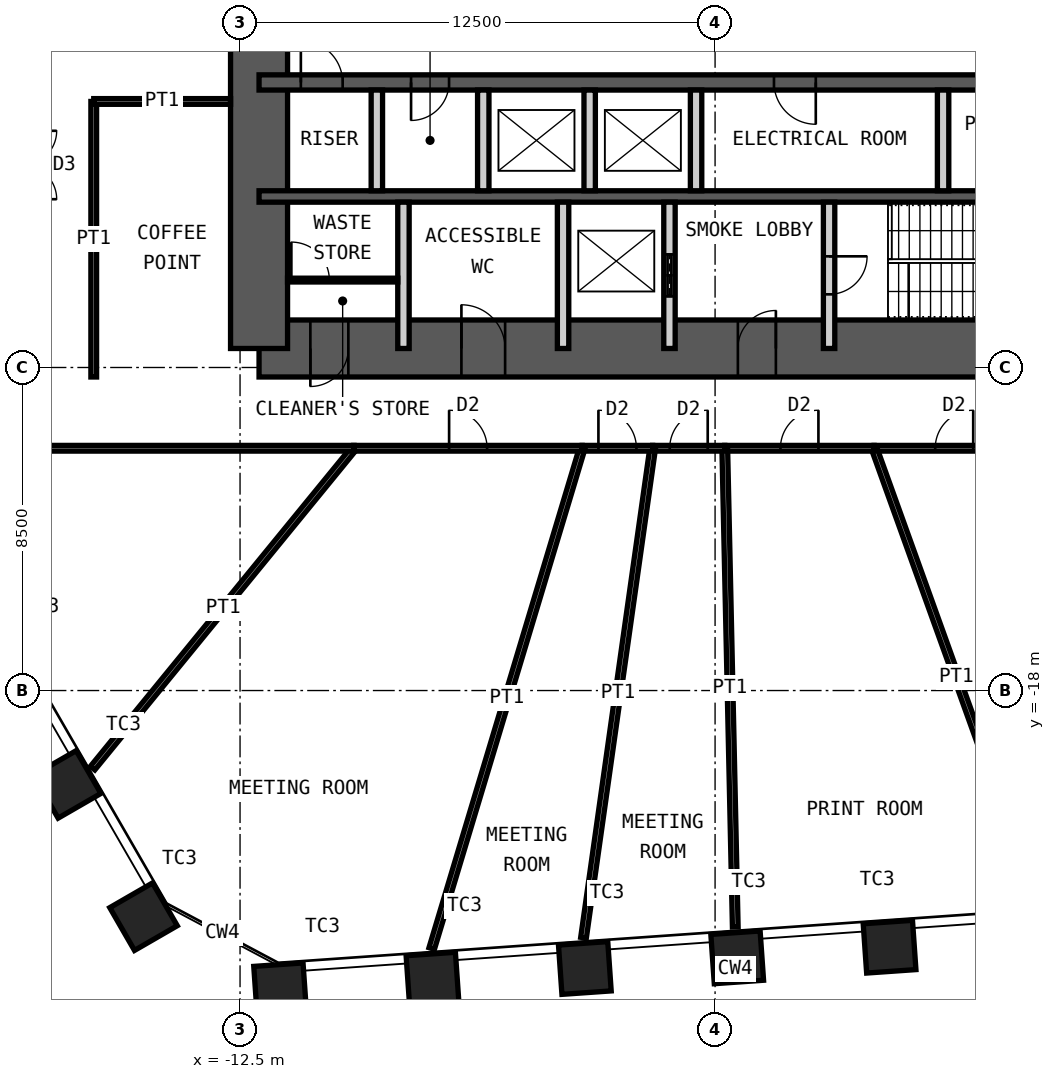
"""IFC4 building model, lengths in metres.
Left out: names, types, materials, properties, quantities, classifications, styles, units other than length and angle.
Written with IfcOpenShell. Run it as: python <this file> out.ifc"""

import sys

from ifc_helpers import new_model, si_unit, direction, frame, frame_2d, origin, origin_2d, place, context, subcontext, project, spatial, rectangle, hollow_rectangle, extrude, element, fill, save


model = new_model("IFC4")
c1 = context("Model", 3, precision=1e-05, world=origin(), true_north=direction((0.0, 1.0)))
c2 = subcontext(c1, "Body", "Model", "MODEL_VIEW")
j1 = project(units=[si_unit("LENGTHUNIT", "METRE"), si_unit("PLANEANGLEUNIT", "RADIAN")], contexts=[c1])
p1 = place(None, origin())
s1 = spatial("IfcSite", under=j1, at=p1, CompositionType="ELEMENT")
p2 = place(p1, origin())
s2 = spatial("IfcBuilding", under=s1, at=p2, CompositionType="ELEMENT")
p3 = place(p2, frame((0.0, 0.0, 111.4)))
s3 = spatial("IfcBuildingStorey", under=s2, at=p3, CompositionType="ELEMENT", Elevation=111.4)
for number, where, z_axis, x_axis in (
    (1, (4.592, -24.74, 0.0), (0.0, 0.0, 1.0), (0.998, 0.07, 0.0)),
    (2, (0.582, -25.02, 0.0), (0.0, 0.0, 1.0), (0.998, 0.07, 0.0)),
    (3, (-3.427, -25.301, 0.0), (0.0, 0.0, 1.0), (0.998, 0.07, 0.0)),
    (4, (-7.436, -25.581, 0.0), (0.0, 0.0, 1.0), (0.998, 0.07, 0.0)),
    (5, (-11.446, -25.861, 0.0), (0.0, 0.0, 1.0), (0.998, 0.07, 0.0)),
    (6, (-15.04, -23.95, 0.0), (0.0, 0.0, 1.0), (0.5, -0.866, 0.0)),
    (7, (-17.049, -20.47, 0.0), (0.0, 0.0, 1.0), (0.5, -0.866, 0.0)),
):
    element("IfcColumn", number, at=place(p3, frame(where, z_axis=z_axis, x_axis=x_axis)), inside=s3, PredefinedType="COLUMN", context=c2, shape_type="SweptSolid", body=[
        extrude(hollow_rectangle(XDim=1.3, YDim=1.3, WallThickness=0.1, at=origin_2d()), origin(), (0.0, 0.0, 1.0), 4.2),
    ])
p4 = place(p3, frame((-12.0, -9.0, 0.0), z_axis=(0.0, 0.0, 1.0), x_axis=(1.0, 0.0, 0.0)))
e8 = element("IfcWall", 8, at=p4, inside=s3, PredefinedType="SHEAR", context=c2, shape_type="SweptSolid", body=[
    extrude(rectangle(XDim=24.0, YDim=1.5, at=frame_2d((12.0, 0.0))), origin(), (0.0, 0.0, 1.0), 4.2),
])
p5 = place(p4, frame((1.35, 0.0, 0.0)))
e9 = element("IfcOpeningElement", 9, at=p5, cuts=e8, PredefinedType="OPENING", context=c2, shape_type="SweptSolid", body=[
    extrude(rectangle(XDim=1.0, YDim=2.1, at=frame_2d((0.5, 1.05))), frame((0.0, 0.76, 0.0), z_axis=(0.0, -1.0, 0.0), x_axis=(1.0, 0.0, 0.0)), (0.0, 0.0, 1.0), 1.52),
])
p6 = place(p4, frame((5.325, 0.0, 0.0)))
e10 = element("IfcOpeningElement", 10, at=p6, cuts=e8, PredefinedType="OPENING", context=c2, shape_type="SweptSolid", body=[
    extrude(rectangle(XDim=1.15, YDim=2.1, at=frame_2d((0.575, 1.05))), frame((0.0, 0.76, 0.0), z_axis=(0.0, -1.0, 0.0), x_axis=(1.0, 0.0, 0.0)), (0.0, 0.0, 1.0), 1.52),
])
p7 = place(p4, frame((12.6, 0.0, 0.0)))
e11 = element("IfcOpeningElement", 11, at=p7, cuts=e8, PredefinedType="OPENING", context=c2, shape_type="SweptSolid", body=[
    extrude(rectangle(XDim=1.0, YDim=2.1, at=frame_2d((0.5, 1.05))), frame((0.0, 0.76, 0.0), z_axis=(0.0, -1.0, 0.0), x_axis=(1.0, 0.0, 0.0)), (0.0, 0.0, 1.0), 1.52),
])
p8 = place(p3, frame((-12.0, -9.0, 0.0), z_axis=(0.0, 0.0, 1.0), x_axis=(0.0, 1.0, 0.0)))
e12 = element("IfcWall", 12, at=p8, inside=s3, PredefinedType="SHEAR", context=c2, shape_type="SweptSolid", body=[
    extrude(rectangle(XDim=18.0, YDim=1.5, at=frame_2d((9.0, 0.0))), origin(), (0.0, 0.0, 1.0), 4.2),
])
p9 = place(p8, frame((8.1, 0.0, 0.0)))
e13 = element("IfcOpeningElement", 13, at=p9, cuts=e12, PredefinedType="OPENING", context=c2, shape_type="SweptSolid", body=[
    extrude(rectangle(XDim=1.8, YDim=2.1, at=frame_2d((0.9, 1.05))), frame((0.0, 0.76, 0.0), z_axis=(0.0, -1.0, 0.0), x_axis=(1.0, 0.0, 0.0)), (0.0, 0.0, 1.0), 1.52),
])
p10 = place(p3, frame((-12.0, -2.0, 0.0), z_axis=(0.0, 0.0, 1.0), x_axis=(1.0, 0.0, 0.0)))
e14 = element("IfcWall", 14, at=p10, inside=s3, PredefinedType="SHEAR", context=c2, shape_type="SweptSolid", body=[
    extrude(rectangle(XDim=24.0, YDim=0.4, at=frame_2d((12.0, 0.0))), origin(), (0.0, 0.0, 1.0), 4.2),
])
p11 = place(p10, frame((1.1, 0.0, 0.0)))
e15 = element("IfcOpeningElement", 15, at=p11, cuts=e14, PredefinedType="OPENING", context=c2, shape_type="SweptSolid", body=[
    extrude(rectangle(XDim=1.1, YDim=2.1, at=frame_2d((0.55, 1.05))), frame((0.0, 0.21, 0.0), z_axis=(0.0, -1.0, 0.0), x_axis=(1.0, 0.0, 0.0)), (0.0, 0.0, 1.0), 0.42),
])
p12 = place(p10, frame((13.55, 0.0, 0.0)))
e16 = element("IfcOpeningElement", 16, at=p12, cuts=e14, PredefinedType="OPENING", context=c2, shape_type="SweptSolid", body=[
    extrude(rectangle(XDim=1.1, YDim=2.1, at=frame_2d((0.55, 1.05))), frame((0.0, 0.21, 0.0), z_axis=(0.0, -1.0, 0.0), x_axis=(1.0, 0.0, 0.0)), (0.0, 0.0, 1.0), 0.42),
])
p13 = place(p10, frame((20.7, 0.0, 0.0)))
e17 = element("IfcOpeningElement", 17, at=p13, cuts=e14, PredefinedType="OPENING", context=c2, shape_type="SweptSolid", body=[
    extrude(rectangle(XDim=1.1, YDim=2.1, at=frame_2d((0.55, 1.05))), frame((0.0, 0.21, 0.0), z_axis=(0.0, -1.0, 0.0), x_axis=(1.0, 0.0, 0.0)), (0.0, 0.0, 1.0), 0.42),
])
p14 = place(p10, frame((4.0, 0.0, 0.0)))
e18 = element("IfcOpeningElement", 18, at=p14, cuts=e14, PredefinedType="OPENING", context=c2, shape_type="SweptSolid", body=[
    extrude(rectangle(XDim=1.0, YDim=2.1, at=frame_2d((0.5, 1.05))), frame((0.0, 0.21, 0.0), z_axis=(0.0, -1.0, 0.0), x_axis=(1.0, 0.0, 0.0)), (0.0, 0.0, 1.0), 0.42),
])
p15 = place(p3, frame((-12.0, -5.0, 0.0), z_axis=(0.0, 0.0, 1.0), x_axis=(1.0, 0.0, 0.0)))
e19 = element("IfcWall", 19, at=p15, inside=s3, PredefinedType="SHEAR", context=c2, shape_type="SweptSolid", body=[
    extrude(rectangle(XDim=24.0, YDim=0.3, at=frame_2d((12.0, 0.0))), origin(), (0.0, 0.0, 1.0), 4.2),
])
for number, where, z_axis, x_axis in (
    (20, (-8.9, -4.85, 0.0), (0.0, 0.0, 1.0), (0.0, 1.0, 0.0)),
    (21, (-6.1, -4.85, 0.0), (0.0, 0.0, 1.0), (0.0, 1.0, 0.0)),
    (22, (-3.3, -4.85, 0.0), (0.0, 0.0, 1.0), (0.0, 1.0, 0.0)),
    (23, (-0.5, -4.85, 0.0), (0.0, 0.0, 1.0), (0.0, 1.0, 0.0)),
    (24, (6.0, -4.85, 0.0), (0.0, 0.0, 1.0), (0.0, 1.0, 0.0)),
):
    element("IfcWall", number, at=place(p3, frame(where, z_axis=z_axis, x_axis=x_axis)), inside=s3, PredefinedType="PARTITIONING", context=c2, shape_type="SweptSolid", body=[
        extrude(rectangle(XDim=2.65, YDim=0.3, at=frame_2d((1.325, 0.0))), origin(), (0.0, 0.0, 1.0), 3.98),
    ])
for number, where, z_axis, x_axis in (
    (25, (-8.2, -9.0, 0.0), (0.0, 0.0, 1.0), (0.0, 1.0, 0.0)),
    (26, (-4.0, -9.0, 0.0), (0.0, 0.0, 1.0), (0.0, 1.0, 0.0)),
):
    element("IfcWall", number, at=place(p3, frame(where, z_axis=z_axis, x_axis=x_axis)), inside=s3, PredefinedType="PARTITIONING", context=c2, shape_type="SweptSolid", body=[
        extrude(rectangle(XDim=3.85, YDim=0.3, at=frame_2d((1.925, 0.0))), origin(), (0.0, 0.0, 1.0), 3.98),
    ])
p16 = place(p3, frame((-1.2, -9.0, 0.0), z_axis=(0.0, 0.0, 1.0), x_axis=(0.0, 1.0, 0.0)))
e27 = element("IfcWall", 27, at=p16, inside=s3, PredefinedType="PARTITIONING", context=c2, shape_type="SweptSolid", body=[
    extrude(rectangle(XDim=3.85, YDim=0.3, at=frame_2d((1.925, 0.0))), origin(), (0.0, 0.0, 1.0), 3.98),
])
p17 = place(p16, frame((1.375, 0.0, 0.0)))
e28 = element("IfcOpeningElement", 28, at=p17, cuts=e27, PredefinedType="OPENING", context=c2, shape_type="SweptSolid", body=[
    extrude(rectangle(XDim=1.1, YDim=2.4, at=frame_2d((0.55, 1.2))), frame((0.0, 0.16, 0.0), z_axis=(0.0, -1.0, 0.0), x_axis=(1.0, 0.0, 0.0)), (0.0, 0.0, 1.0), 0.32),
])
p18 = place(p3, frame((3.0, -9.0, 0.0), z_axis=(0.0, 0.0, 1.0), x_axis=(0.0, 1.0, 0.0)))
e29 = element("IfcWall", 29, at=p18, inside=s3, PredefinedType="PARTITIONING", context=c2, shape_type="SweptSolid", body=[
    extrude(rectangle(XDim=3.85, YDim=0.3, at=frame_2d((1.925, 0.0))), origin(), (0.0, 0.0, 1.0), 3.98),
])
p19 = place(p18, frame((1.425, 0.0, 0.0)))
e30 = element("IfcOpeningElement", 30, at=p19, cuts=e29, PredefinedType="OPENING", context=c2, shape_type="SweptSolid", body=[
    extrude(rectangle(XDim=1.0, YDim=2.1, at=frame_2d((0.5, 1.05))), frame((0.0, 0.16, 0.0), z_axis=(0.0, -1.0, 0.0), x_axis=(1.0, 0.0, 0.0)), (0.0, 0.0, 1.0), 0.32),
])
p20 = place(p3, frame((-11.25, -7.2, 0.0), z_axis=(0.0, 0.0, 1.0), x_axis=(1.0, 0.0, 0.0)))
e31 = element("IfcWall", 31, at=p20, inside=s3, PredefinedType="PARTITIONING", context=c2, shape_type="SweptSolid", body=[
    extrude(rectangle(XDim=2.9, YDim=0.1, at=frame_2d((1.45, 0.0))), origin(), (0.0, 0.0, 1.0), 3.98),
])
p21 = place(p20, frame((0.1, 0.0, 0.0)))
e32 = element("IfcOpeningElement", 32, at=p21, cuts=e31, PredefinedType="OPENING", context=c2, shape_type="SweptSolid", body=[
    extrude(rectangle(XDim=1.0, YDim=2.4, at=frame_2d((0.5, 1.2))), frame((0.0, 0.06, 0.0), z_axis=(0.0, -1.0, 0.0), x_axis=(1.0, 0.0, 0.0)), (0.0, 0.0, 1.0), 0.12),
])
p22 = place(p3, frame((-16.38, -20.042, 0.0), z_axis=(0.0, 0.0, 1.0), x_axis=(0.632814540967, 0.774303400962, 0.0)))
e33 = element("IfcWall", 33, at=p22, inside=s3, PredefinedType="PARTITIONING", context=c2, shape_type="SweptSolid", body=[
    extrude(rectangle(XDim=10.871, YDim=0.15, at=frame_2d((5.435, 0.0))), origin(), (0.0, 0.0, 1.0), 3.33),
])
p23 = place(p3, frame((-9.501, -11.625, 0.0), z_axis=(0.0, 0.0, 1.0), x_axis=(-1.0, 0.0, 0.0)))
e34 = element("IfcWall", 34, at=p23, inside=s3, PredefinedType="PARTITIONING", context=c2, shape_type="SweptSolid", body=[
    extrude(rectangle(XDim=8.724, YDim=0.15, at=frame_2d((4.362, 0.0))), origin(), (0.0, 0.0, 1.0), 4.03),
])
p24 = place(p3, frame((8.401, -11.625, 0.0), z_axis=(0.0, 0.0, 1.0), x_axis=(-1.0, 0.0, 0.0)))
e35 = element("IfcWall", 35, at=p24, inside=s3, PredefinedType="PARTITIONING", context=c2, shape_type="SweptSolid", body=[
    extrude(rectangle(XDim=4.217, YDim=0.15, at=frame_2d((2.109, 0.0))), origin(), (0.0, 0.0, 1.0), 4.03),
])
p25 = place(p24, frame((1.609, 0.0, 0.0)))
e36 = element("IfcOpeningElement", 36, at=p25, cuts=e35, PredefinedType="OPENING", context=c2, shape_type="SweptSolid", body=[
    extrude(rectangle(XDim=1.0, YDim=2.4, at=frame_2d((0.5, 1.2))), frame((0.0, 0.085, 0.0), z_axis=(0.0, -1.0, 0.0), x_axis=(1.0, 0.0, 0.0)), (0.0, 0.0, 1.0), 0.17),
])
p26 = place(p3, frame((8.518, -23.667, 0.0), z_axis=(0.0, 0.0, 1.0), x_axis=(-0.338635030469, 0.940917805198, 0.0)))
e37 = element("IfcWall", 37, at=p26, inside=s3, PredefinedType="PARTITIONING", context=c2, shape_type="SweptSolid", body=[
    extrude(rectangle(XDim=12.798, YDim=0.15, at=frame_2d((6.399, 0.0))), origin(), (0.0, 0.0, 1.0), 3.33),
])
p27 = place(p3, frame((4.184, -11.625, 0.0), z_axis=(0.0, 0.0, 1.0), x_axis=(-1.0, 0.0, 0.0)))
e38 = element("IfcWall", 38, at=p27, inside=s3, PredefinedType="PARTITIONING", context=c2, shape_type="SweptSolid", body=[
    extrude(rectangle(XDim=3.929, YDim=0.15, at=frame_2d((1.965, 0.0))), origin(), (0.0, 0.0, 1.0), 4.03),
])
p28 = place(p27, frame((1.465, 0.0, 0.0)))
e39 = element("IfcOpeningElement", 39, at=p28, cuts=e38, PredefinedType="OPENING", context=c2, shape_type="SweptSolid", body=[
    extrude(rectangle(XDim=1.0, YDim=2.4, at=frame_2d((0.5, 1.2))), frame((0.0, 0.085, 0.0), z_axis=(0.0, -1.0, 0.0), x_axis=(1.0, 0.0, 0.0)), (0.0, 0.0, 1.0), 0.17),
])
p29 = place(p3, frame((0.531, -24.222, 0.0), z_axis=(0.0, 0.0, 1.0), x_axis=(-0.021933557026, 0.999759430601, 0.0)))
e40 = element("IfcWall", 40, at=p29, inside=s3, PredefinedType="PARTITIONING", context=c2, shape_type="SweptSolid", body=[
    extrude(rectangle(XDim=12.6, YDim=0.15, at=frame_2d((6.3, 0.0))), origin(), (0.0, 0.0, 1.0), 3.33),
])
p30 = place(p3, frame((0.255, -11.625, 0.0), z_axis=(0.0, 0.0, 1.0), x_axis=(-1.0, 0.0, 0.0)))
e41 = element("IfcWall", 41, at=p30, inside=s3, PredefinedType="PARTITIONING", context=c2, shape_type="SweptSolid", body=[
    extrude(rectangle(XDim=1.897, YDim=0.15, at=frame_2d((0.949, 0.0))), origin(), (0.0, 0.0, 1.0), 4.03),
])
p31 = place(p30, frame((0.449, 0.0, 0.0)))
e42 = element("IfcOpeningElement", 42, at=p31, cuts=e41, PredefinedType="OPENING", context=c2, shape_type="SweptSolid", body=[
    extrude(rectangle(XDim=1.0, YDim=2.4, at=frame_2d((0.5, 1.2))), frame((0.0, 0.085, 0.0), z_axis=(0.0, -1.0, 0.0), x_axis=(1.0, 0.0, 0.0)), (0.0, 0.0, 1.0), 0.17),
])
p32 = place(p3, frame((-3.462, -24.503, 0.0), z_axis=(0.0, 0.0, 1.0), x_axis=(0.139899618934, 0.990165691499, 0.0)))
e43 = element("IfcWall", 43, at=p32, inside=s3, PredefinedType="PARTITIONING", context=c2, shape_type="SweptSolid", body=[
    extrude(rectangle(XDim=13.006, YDim=0.15, at=frame_2d((6.503, 0.0))), origin(), (0.0, 0.0, 1.0), 3.33),
])
p33 = place(p3, frame((-1.642, -11.625, 0.0), z_axis=(0.0, 0.0, 1.0), x_axis=(-1.0, 0.0, 0.0)))
e44 = element("IfcWall", 44, at=p33, inside=s3, PredefinedType="PARTITIONING", context=c2, shape_type="SweptSolid", body=[
    extrude(rectangle(XDim=1.855, YDim=0.15, at=frame_2d((0.927, 0.0))), origin(), (0.0, 0.0, 1.0), 4.03),
])
p34 = place(p33, frame((0.427, 0.0, 0.0)))
e45 = element("IfcOpeningElement", 45, at=p34, cuts=e44, PredefinedType="OPENING", context=c2, shape_type="SweptSolid", body=[
    extrude(rectangle(XDim=1.0, YDim=2.4, at=frame_2d((0.5, 1.2))), frame((0.0, 0.085, 0.0), z_axis=(0.0, -1.0, 0.0), x_axis=(1.0, 0.0, 0.0)), (0.0, 0.0, 1.0), 0.17),
])
p35 = place(p3, frame((-7.456, -24.787, 0.0), z_axis=(0.0, 0.0, 1.0), x_axis=(0.288055049501, 0.957613851433, 0.0)))
e46 = element("IfcWall", 46, at=p35, inside=s3, PredefinedType="PARTITIONING", context=c2, shape_type="SweptSolid", body=[
    extrude(rectangle(XDim=13.745, YDim=0.15, at=frame_2d((6.872, 0.0))), origin(), (0.0, 0.0, 1.0), 3.28),
])
p36 = place(p3, frame((-3.497, -11.625, 0.0), z_axis=(0.0, 0.0, 1.0), x_axis=(-1.0, 0.0, 0.0)))
e47 = element("IfcWall", 47, at=p36, inside=s3, PredefinedType="PARTITIONING", context=c2, shape_type="SweptSolid", body=[
    extrude(rectangle(XDim=6.004, YDim=0.15, at=frame_2d((3.002, 0.0))), origin(), (0.0, 0.0, 1.0), 4.03),
])
p37 = place(p36, frame((2.502, 0.0, 0.0)))
e48 = element("IfcOpeningElement", 48, at=p37, cuts=e47, PredefinedType="OPENING", context=c2, shape_type="SweptSolid", body=[
    extrude(rectangle(XDim=1.0, YDim=2.4, at=frame_2d((0.5, 1.2))), frame((0.0, 0.085, 0.0), z_axis=(0.0, -1.0, 0.0), x_axis=(1.0, 0.0, 0.0)), (0.0, 0.0, 1.0), 0.17),
])
p38 = place(p3, frame((-16.35, -9.75, 0.0), z_axis=(0.0, 0.0, 1.0), x_axis=(0.0, 1.0, 0.0)))
e49 = element("IfcWall", 49, at=p38, inside=s3, PredefinedType="PARTITIONING", context=c2, shape_type="SweptSolid", body=[
    extrude(rectangle(XDim=7.25, YDim=0.15, at=frame_2d((3.625, 0.0))), origin(), (0.0, 0.0, 1.0), 4.03),
])
p39 = place(p3, frame((-12.75, -2.5, 0.0), z_axis=(0.0, 0.0, 1.0), x_axis=(-1.0, 0.0, 0.0)))
e50 = element("IfcWall", 50, at=p39, inside=s3, PredefinedType="PARTITIONING", context=c2, shape_type="SweptSolid", body=[
    extrude(rectangle(XDim=3.6, YDim=0.15, at=frame_2d((1.8, 0.0))), origin(), (0.0, 0.0, 1.0), 3.33),
])
p40 = place(p5, origin())
e51 = element("IfcDoor", 51, at=p40, inside=s3, OperationType="SINGLE_SWING_LEFT", PredefinedType="DOOR", context=c2, shape_type="SweptSolid", body=[
    extrude(rectangle(XDim=1.0, YDim=2.1, at=frame_2d((0.5, 1.05))), frame((0.0, 0.025, 0.0), z_axis=(0.0, -1.0, 0.0), x_axis=(1.0, 0.0, 0.0)), (0.0, 0.0, 1.0), 0.05),
])
fill(e9, e51)
p41 = place(p6, origin())
e52 = element("IfcDoor", 52, at=p41, inside=s3, OperationType="SINGLE_SWING_RIGHT", PredefinedType="DOOR", context=c2, shape_type="SweptSolid", body=[
    extrude(rectangle(XDim=1.15, YDim=2.1, at=frame_2d((0.575, 1.05))), frame((0.0, 0.025, 0.0), z_axis=(0.0, -1.0, 0.0), x_axis=(1.0, 0.0, 0.0)), (0.0, 0.0, 1.0), 0.05),
])
fill(e10, e52)
p42 = place(p7, origin())
e53 = element("IfcDoor", 53, at=p42, inside=s3, OperationType="SINGLE_SWING_LEFT", PredefinedType="DOOR", context=c2, shape_type="SweptSolid", body=[
    extrude(rectangle(XDim=1.0, YDim=2.1, at=frame_2d((0.5, 1.05))), frame((0.0, 0.025, 0.0), z_axis=(0.0, -1.0, 0.0), x_axis=(1.0, 0.0, 0.0)), (0.0, 0.0, 1.0), 0.05),
])
fill(e11, e53)
p43 = place(p19, origin())
e54 = element("IfcDoor", 54, at=p43, inside=s3, OperationType="SINGLE_SWING_RIGHT", PredefinedType="DOOR", context=c2, shape_type="SweptSolid", body=[
    extrude(rectangle(XDim=1.0, YDim=2.1, at=frame_2d((0.5, 1.05))), frame((0.0, 0.025, 0.0), z_axis=(0.0, -1.0, 0.0), x_axis=(1.0, 0.0, 0.0)), (0.0, 0.0, 1.0), 0.05),
])
fill(e30, e54)
p44 = place(p11, origin())
e55 = element("IfcDoor", 55, at=p44, inside=s3, OperationType="SINGLE_SWING_RIGHT", PredefinedType="DOOR", context=c2, shape_type="SweptSolid", body=[
    extrude(rectangle(XDim=1.1, YDim=2.1, at=frame_2d((0.55, 1.05))), frame((0.0, 0.025, 0.0), z_axis=(0.0, -1.0, 0.0), x_axis=(1.0, 0.0, 0.0)), (0.0, 0.0, 1.0), 0.05),
])
fill(e15, e55)
p45 = place(p12, origin())
e56 = element("IfcDoor", 56, at=p45, inside=s3, OperationType="SINGLE_SWING_RIGHT", PredefinedType="DOOR", context=c2, shape_type="SweptSolid", body=[
    extrude(rectangle(XDim=1.1, YDim=2.1, at=frame_2d((0.55, 1.05))), frame((0.0, 0.025, 0.0), z_axis=(0.0, -1.0, 0.0), x_axis=(1.0, 0.0, 0.0)), (0.0, 0.0, 1.0), 0.05),
])
fill(e16, e56)
p46 = place(p17, origin())
e57 = element("IfcDoor", 57, at=p46, inside=s3, OperationType="DOUBLE_DOOR_SLIDING", PredefinedType="DOOR", context=c2, shape_type="SweptSolid", body=[
    extrude(rectangle(XDim=1.1, YDim=2.4, at=frame_2d((0.55, 1.2))), frame((0.0, 0.025, 0.0), z_axis=(0.0, -1.0, 0.0), x_axis=(1.0, 0.0, 0.0)), (0.0, 0.0, 1.0), 0.05),
])
fill(e28, e57)
p47 = place(p14, origin())
e58 = element("IfcDoor", 58, at=p47, inside=s3, OperationType="SINGLE_SWING_LEFT", PredefinedType="DOOR", context=c2, shape_type="SweptSolid", body=[
    extrude(rectangle(XDim=1.0, YDim=2.1, at=frame_2d((0.5, 1.05))), frame((0.0, 0.025, 0.0), z_axis=(0.0, -1.0, 0.0), x_axis=(1.0, 0.0, 0.0)), (0.0, 0.0, 1.0), 0.05),
])
fill(e18, e58)
p48 = place(p21, origin())
e59 = element("IfcDoor", 59, at=p48, inside=s3, OperationType="SINGLE_SWING_RIGHT", PredefinedType="DOOR", context=c2, shape_type="SweptSolid", body=[
    extrude(rectangle(XDim=1.0, YDim=2.4, at=frame_2d((0.5, 1.2))), frame((0.0, 0.025, 0.0), z_axis=(0.0, -1.0, 0.0), x_axis=(1.0, 0.0, 0.0)), (0.0, 0.0, 1.0), 0.05),
])
fill(e32, e59)
p49 = place(p25, origin())
e60 = element("IfcDoor", 60, at=p49, inside=s3, OperationType="SINGLE_SWING_LEFT", PredefinedType="DOOR", context=c2, shape_type="SweptSolid", body=[
    extrude(rectangle(XDim=1.0, YDim=2.4, at=frame_2d((0.5, 1.2))), frame((0.0, 0.025, 0.0), z_axis=(0.0, -1.0, 0.0), x_axis=(1.0, 0.0, 0.0)), (0.0, 0.0, 1.0), 0.05),
])
fill(e36, e60)
p50 = place(p28, origin())
e61 = element("IfcDoor", 61, at=p50, inside=s3, OperationType="SINGLE_SWING_LEFT", PredefinedType="DOOR", context=c2, shape_type="SweptSolid", body=[
    extrude(rectangle(XDim=1.0, YDim=2.4, at=frame_2d((0.5, 1.2))), frame((0.0, 0.025, 0.0), z_axis=(0.0, -1.0, 0.0), x_axis=(1.0, 0.0, 0.0)), (0.0, 0.0, 1.0), 0.05),
])
fill(e39, e61)
p51 = place(p31, origin())
e62 = element("IfcDoor", 62, at=p51, inside=s3, OperationType="SINGLE_SWING_LEFT", PredefinedType="DOOR", context=c2, shape_type="SweptSolid", body=[
    extrude(rectangle(XDim=1.0, YDim=2.4, at=frame_2d((0.5, 1.2))), frame((0.0, 0.025, 0.0), z_axis=(0.0, -1.0, 0.0), x_axis=(1.0, 0.0, 0.0)), (0.0, 0.0, 1.0), 0.05),
])
fill(e42, e62)
p52 = place(p34, origin())
e63 = element("IfcDoor", 63, at=p52, inside=s3, OperationType="SINGLE_SWING_RIGHT", PredefinedType="DOOR", context=c2, shape_type="SweptSolid", body=[
    extrude(rectangle(XDim=1.0, YDim=2.4, at=frame_2d((0.5, 1.2))), frame((0.0, 0.025, 0.0), z_axis=(0.0, -1.0, 0.0), x_axis=(1.0, 0.0, 0.0)), (0.0, 0.0, 1.0), 0.05),
])
fill(e45, e63)
p53 = place(p37, origin())
e64 = element("IfcDoor", 64, at=p53, inside=s3, OperationType="SINGLE_SWING_RIGHT", PredefinedType="DOOR", context=c2, shape_type="SweptSolid", body=[
    extrude(rectangle(XDim=1.0, YDim=2.4, at=frame_2d((0.5, 1.2))), frame((0.0, 0.025, 0.0), z_axis=(0.0, -1.0, 0.0), x_axis=(1.0, 0.0, 0.0)), (0.0, 0.0, 1.0), 0.05),
])
fill(e48, e64)
save(model, sys.argv[1])
